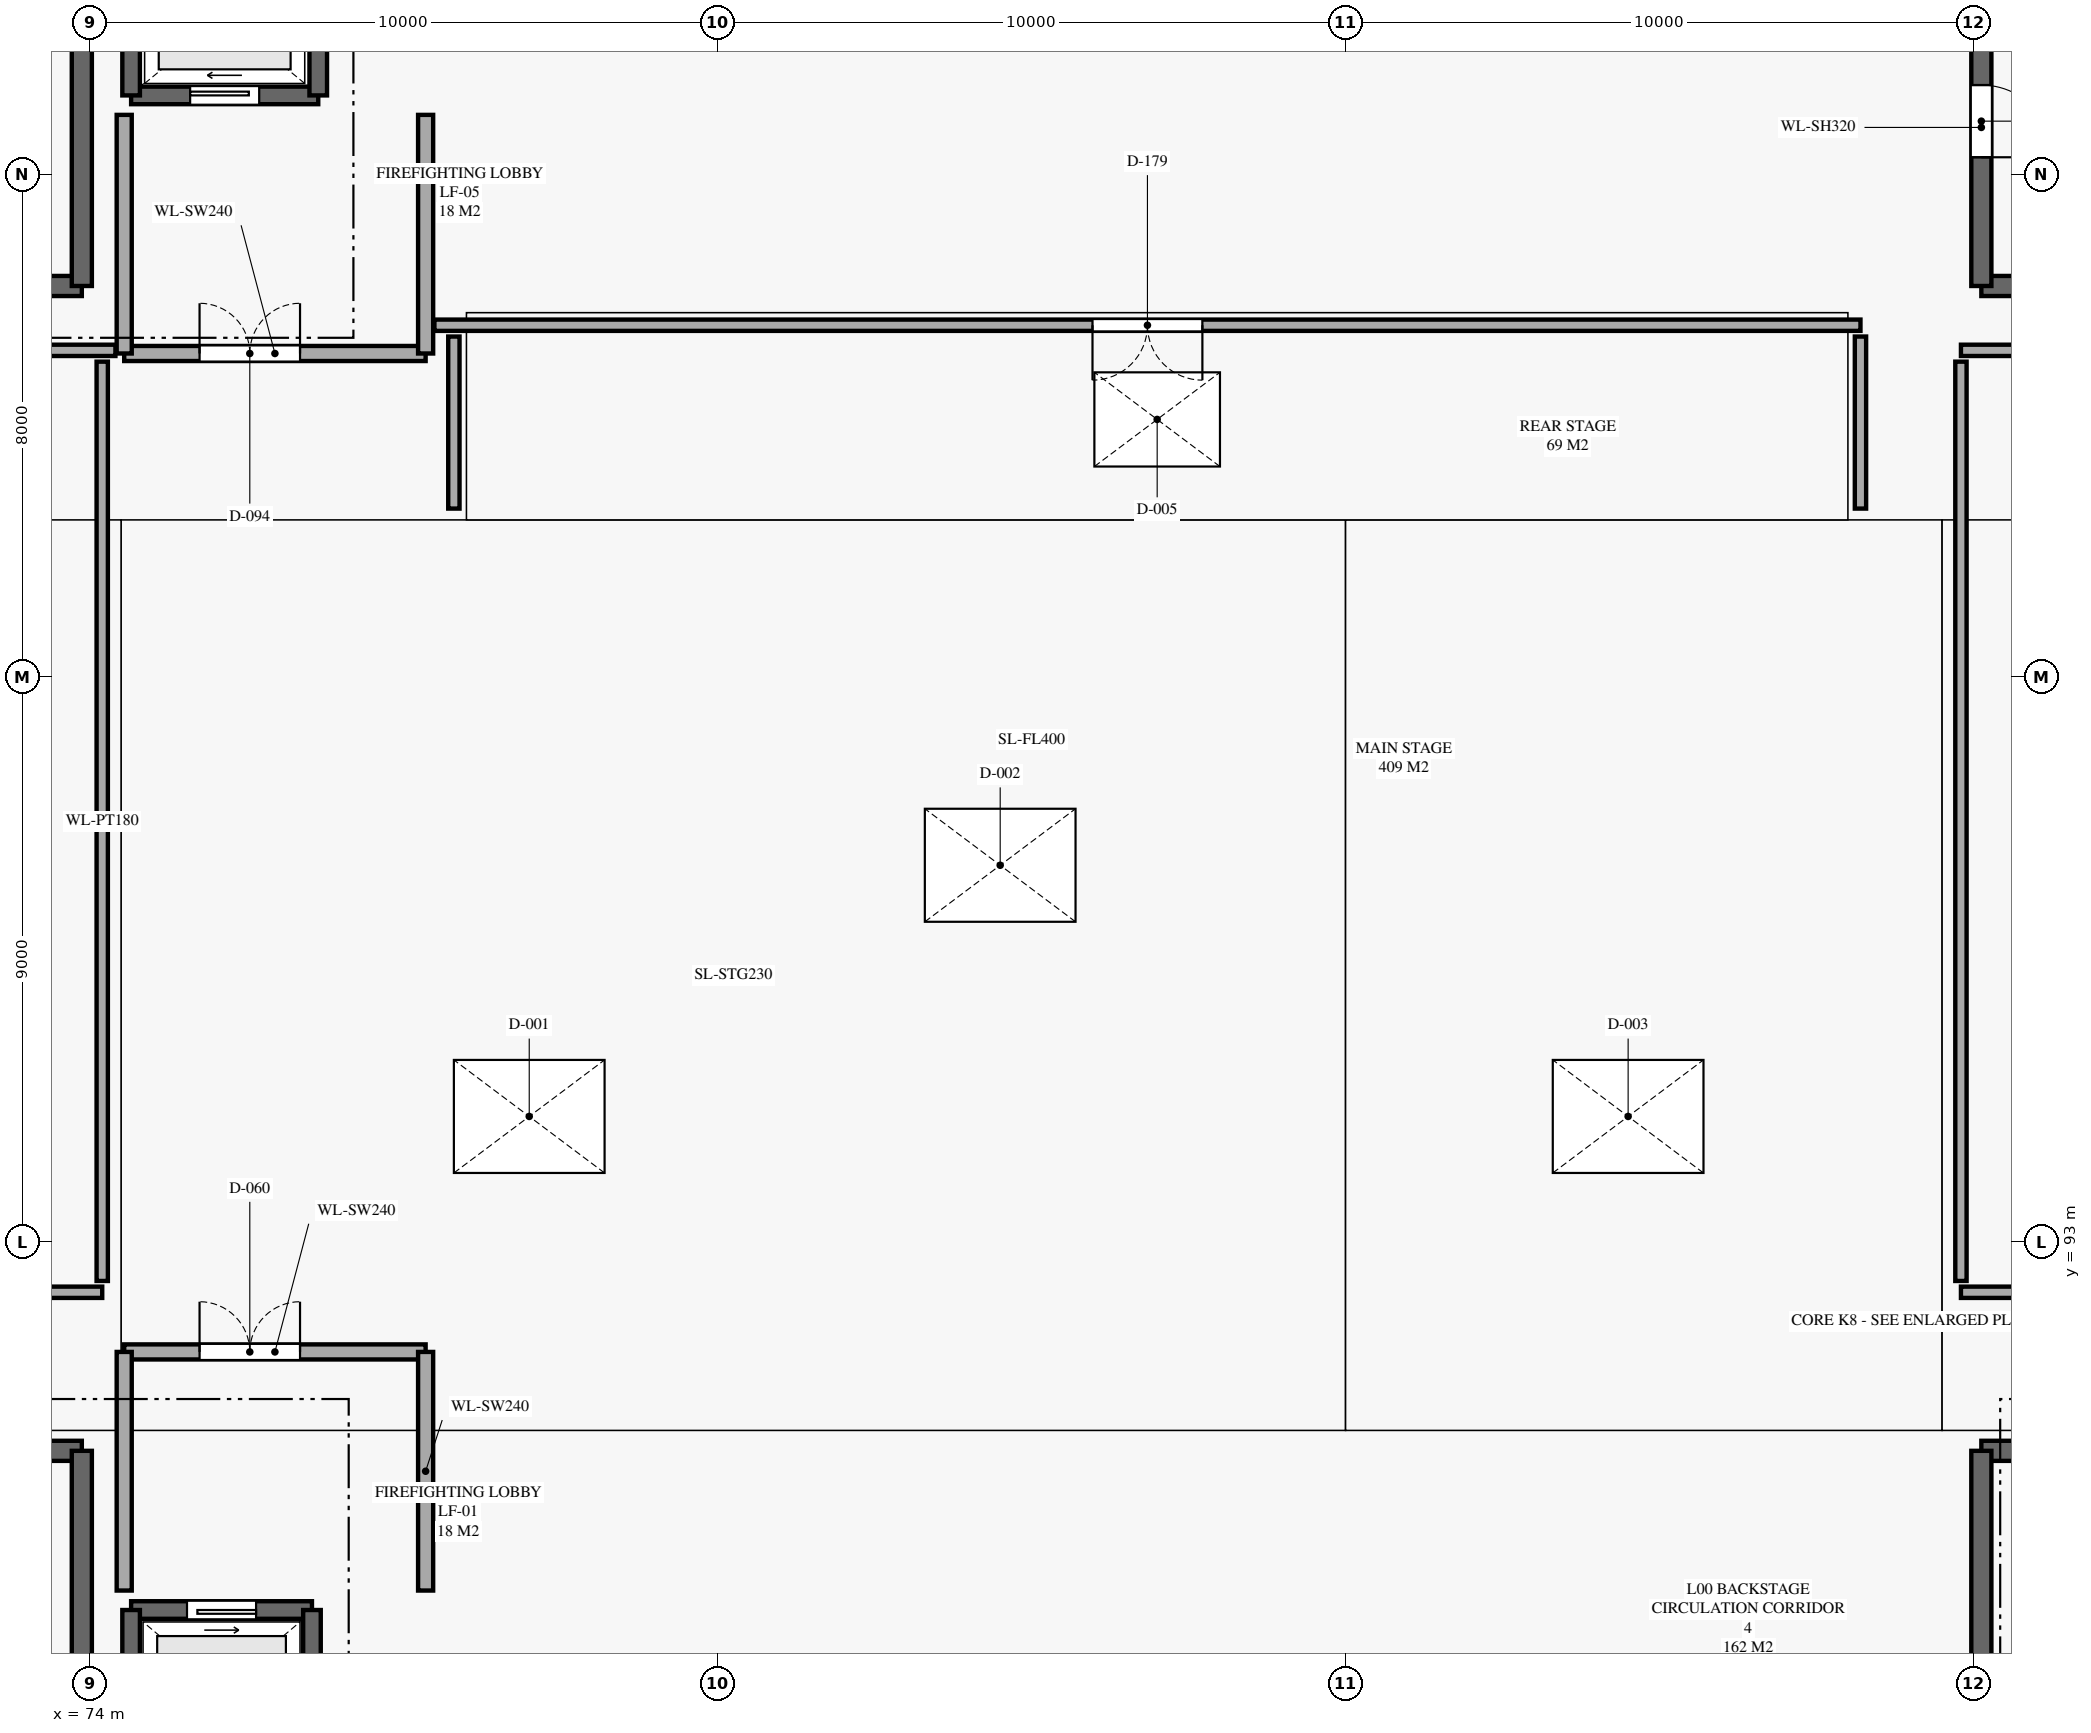
"""IFC4 building model, lengths in metres.
Left out: names, types, materials, properties, quantities, classifications, styles, units other than length and angle.
Written with IfcOpenShell. Run it as: python <this file> out.ifc"""

import sys

from ifc_helpers import new_model, si_unit, direction, frame, frame_2d, origin, origin_2d, place, context, subcontext, project, spatial, rectangle, extrude, element, fill, save


model = new_model("IFC4")
c1 = context("Model", 3, precision=1e-05, world=origin(), true_north=direction((0.0, 1.0)))
c2 = subcontext(c1, "Body", "Model", "MODEL_VIEW")
j1 = project(units=[si_unit("LENGTHUNIT", "METRE"), si_unit("PLANEANGLEUNIT", "RADIAN")], contexts=[c1])
p1 = place(None, origin())
s1 = spatial("IfcSite", under=j1, at=p1, CompositionType="ELEMENT")
p2 = place(p1, origin())
s2 = spatial("IfcBuilding", under=s1, at=p2, CompositionType="ELEMENT")
p3 = place(p2, origin())
s3 = spatial("IfcBuildingStorey", under=s2, at=p3, CompositionType="ELEMENT", Elevation=0.0)
p4 = place(p3, frame((64.625, 108.225, 0.0), z_axis=(0.0, 0.0, 1.0), x_axis=(1.0, 0.0, 0.0)))
e1 = element("IfcWall", 1, at=p4, inside=s3, PredefinedType="SHEAR", context=c2, shape_type="SweptSolid", body=[
    extrude(rectangle(XDim=9.25, YDim=0.32, at=frame_2d((4.625, 0.0))), origin(), (0.0, 0.0, 1.0), 4.675),
])
p5 = place(p3, frame((73.875, 108.225, 0.0), z_axis=(0.0, 0.0, 1.0), x_axis=(0.0, 1.0, 0.0)))
e2 = element("IfcWall", 2, at=p5, inside=s3, PredefinedType="SHEAR", context=c2, shape_type="SweptSolid", body=[
    extrude(rectangle(XDim=5.05, YDim=0.32, at=frame_2d((2.525, 0.0))), origin(), (0.0, 0.0, 1.0), 4.675),
])
p6 = place(p3, frame((104.125, 108.225, 0.0), z_axis=(0.0, 0.0, 1.0), x_axis=(1.0, 0.0, 0.0)))
e3 = element("IfcWall", 3, at=p6, inside=s3, PredefinedType="SHEAR", context=c2, shape_type="SweptSolid", body=[
    extrude(rectangle(XDim=9.25, YDim=0.32, at=frame_2d((4.625, 0.0))), origin(), (0.0, 0.0, 1.0), 4.675),
])
p7 = place(p3, frame((104.125, 113.275, 0.0), z_axis=(0.0, 0.0, 1.0), x_axis=(0.0, -1.0, 0.0)))
e4 = element("IfcWall", 4, at=p7, inside=s3, PredefinedType="SHEAR", context=c2, shape_type="SweptSolid", body=[
    extrude(rectangle(XDim=5.05, YDim=0.32, at=frame_2d((2.525, 0.0))), origin(), (0.0, 0.0, 1.0), 4.675),
])
p8 = place(p7, frame((1.85, 0.0, 0.0)))
e5 = element("IfcOpeningElement", 5, at=p8, cuts=e4, PredefinedType="OPENING", context=c2, shape_type="SweptSolid", body=[
    extrude(rectangle(XDim=1.15, YDim=2.2, at=frame_2d((0.575, 1.1))), frame((0.0, 0.17, 0.0), z_axis=(0.0, -1.0, 0.0), x_axis=(1.0, 0.0, 0.0)), (0.0, 0.0, 1.0), 0.34),
])
p9 = place(p3, frame((73.875, 89.675, 0.0), z_axis=(0.0, 0.0, 1.0), x_axis=(-1.0, 0.0, 0.0)))
e6 = element("IfcWall", 6, at=p9, inside=s3, PredefinedType="SHEAR", context=c2, shape_type="SweptSolid", body=[
    extrude(rectangle(XDim=9.25, YDim=0.32, at=frame_2d((4.625, 0.0))), origin(), (0.0, 0.0, 1.0), 4.675),
])
p10 = place(p9, frame((7.2, 0.0, 0.0)))
e7 = element("IfcOpeningElement", 7, at=p10, cuts=e6, PredefinedType="OPENING", context=c2, shape_type="SweptSolid", body=[
    extrude(rectangle(XDim=1.15, YDim=2.2, at=frame_2d((0.575, 1.1))), frame((0.0, 0.17, 0.0), z_axis=(0.0, -1.0, 0.0), x_axis=(1.0, 0.0, 0.0)), (0.0, 0.0, 1.0), 0.34),
])
p11 = place(p3, frame((73.875, 84.625, 0.0), z_axis=(0.0, 0.0, 1.0), x_axis=(0.0, 1.0, 0.0)))
e8 = element("IfcWall", 8, at=p11, inside=s3, PredefinedType="SHEAR", context=c2, shape_type="SweptSolid", body=[
    extrude(rectangle(XDim=5.05, YDim=0.32, at=frame_2d((2.525, 0.0))), origin(), (0.0, 0.0, 1.0), 4.675),
])
p12 = place(p3, frame((113.375, 89.675, 0.0), z_axis=(0.0, 0.0, 1.0), x_axis=(-1.0, 0.0, 0.0)))
e9 = element("IfcWall", 9, at=p12, inside=s3, PredefinedType="SHEAR", context=c2, shape_type="SweptSolid", body=[
    extrude(rectangle(XDim=9.25, YDim=0.32, at=frame_2d((4.625, 0.0))), origin(), (0.0, 0.0, 1.0), 4.675),
])
p13 = place(p12, frame((7.2, 0.0, 0.0)))
e10 = element("IfcOpeningElement", 10, at=p13, cuts=e9, PredefinedType="OPENING", context=c2, shape_type="SweptSolid", body=[
    extrude(rectangle(XDim=1.15, YDim=2.2, at=frame_2d((0.575, 1.1))), frame((0.0, 0.17, 0.0), z_axis=(0.0, -1.0, 0.0), x_axis=(1.0, 0.0, 0.0)), (0.0, 0.0, 1.0), 0.34),
])
p14 = place(p3, frame((104.125, 89.675, 0.0), z_axis=(0.0, 0.0, 1.0), x_axis=(0.0, -1.0, 0.0)))
e11 = element("IfcWall", 11, at=p14, inside=s3, PredefinedType="SHEAR", context=c2, shape_type="SweptSolid", body=[
    extrude(rectangle(XDim=5.05, YDim=0.32, at=frame_2d((2.525, 0.0))), origin(), (0.0, 0.0, 1.0), 4.675),
])
p15 = place(p3, frame((77.54, 87.14, 0.0), z_axis=(0.0, 0.0, 1.0), x_axis=(-1.0, 0.0, 0.0)))
e12 = element("IfcWall", 12, at=p15, inside=s3, PredefinedType="SHEAR", context=c2, shape_type="SweptSolid", body=[
    extrude(rectangle(XDim=2.88, YDim=0.28, at=frame_2d((1.44, 0.0))), origin(), (0.0, 0.0, 1.0), 4.675),
])
p16 = place(p15, frame((0.89, 0.0, 0.0)))
e13 = element("IfcOpeningElement", 13, at=p16, cuts=e12, PredefinedType="OPENING", context=c2, shape_type="SweptSolid", body=[
    extrude(rectangle(XDim=1.1, YDim=2.2, at=frame_2d((0.55, 1.1))), frame((0.0, 0.15, 0.0), z_axis=(0.0, -1.0, 0.0), x_axis=(1.0, 0.0, 0.0)), (0.0, 0.0, 1.0), 0.3),
])
for number, where, z_axis, x_axis in (
    (14, (74.66, 87.14, 0.0), (0.0, 0.0, 1.0), (0.0, -1.0, 0.0)),
    (15, (77.54, 84.66, 0.0), (0.0, 0.0, 1.0), (0.0, 1.0, 0.0)),
):
    element("IfcWall", number, at=place(p3, frame(where, z_axis=z_axis, x_axis=x_axis)), inside=s3, PredefinedType="SHEAR", context=c2, shape_type="SweptSolid", body=[
        extrude(rectangle(XDim=2.48, YDim=0.28, at=frame_2d((1.24, 0.0))), origin(), (0.0, 0.0, 1.0), 4.675),
    ])
p17 = place(p3, frame((74.55, 91.25, 0.0), z_axis=(0.0, 0.0, 1.0), x_axis=(1.0, 0.0, 0.0)))
e16 = element("IfcWall", 16, at=p17, inside=s3, PredefinedType="SOLIDWALL", context=c2, shape_type="SweptSolid", body=[
    extrude(rectangle(XDim=4.8, YDim=0.24, at=frame_2d((2.4, 0.0))), origin(), (0.0, 0.0, 1.0), 4.675),
])
p18 = place(p17, frame((1.2, 0.0, 0.0)))
e17 = element("IfcOpeningElement", 17, at=p18, cuts=e16, PredefinedType="OPENING", context=c2, shape_type="SweptSolid", body=[
    extrude(rectangle(XDim=1.6, YDim=2.2, at=frame_2d((0.8, 1.1))), frame((0.0, 0.13, 0.0), z_axis=(0.0, -1.0, 0.0), x_axis=(1.0, 0.0, 0.0)), (0.0, 0.0, 1.0), 0.26),
])
for number, where, z_axis, x_axis in (
    (18, (74.55, 91.25, 0.0), (0.0, 0.0, 1.0), (0.0, -1.0, 0.0)),
    (19, (79.35, 87.45, 0.0), (0.0, 0.0, 1.0), (0.0, 1.0, 0.0)),
):
    element("IfcWall", number, at=place(p3, frame(where, z_axis=z_axis, x_axis=x_axis)), inside=s3, PredefinedType="SOLIDWALL", context=c2, shape_type="SweptSolid", body=[
        extrude(rectangle(XDim=3.8, YDim=0.24, at=frame_2d((1.9, 0.0))), origin(), (0.0, 0.0, 1.0), 4.675),
    ])
p19 = place(p3, frame((74.66, 111.26, 0.0), z_axis=(0.0, 0.0, 1.0), x_axis=(1.0, 0.0, 0.0)))
e20 = element("IfcWall", 20, at=p19, inside=s3, PredefinedType="SHEAR", context=c2, shape_type="SweptSolid", body=[
    extrude(rectangle(XDim=2.98, YDim=0.28, at=frame_2d((1.49, 0.0))), origin(), (0.0, 0.0, 1.0), 4.675),
])
p20 = place(p19, frame((0.94, 0.0, 0.0)))
e21 = element("IfcOpeningElement", 21, at=p20, cuts=e20, PredefinedType="OPENING", context=c2, shape_type="SweptSolid", body=[
    extrude(rectangle(XDim=1.1, YDim=2.2, at=frame_2d((0.55, 1.1))), frame((0.0, 0.15, 0.0), z_axis=(0.0, -1.0, 0.0), x_axis=(1.0, 0.0, 0.0)), (0.0, 0.0, 1.0), 0.3),
])
for number, where, z_axis, x_axis in (
    (22, (74.66, 113.74, 0.0), (0.0, 0.0, 1.0), (0.0, -1.0, 0.0)),
    (23, (77.64, 111.26, 0.0), (0.0, 0.0, 1.0), (0.0, 1.0, 0.0)),
):
    element("IfcWall", number, at=place(p3, frame(where, z_axis=z_axis, x_axis=x_axis)), inside=s3, PredefinedType="SHEAR", context=c2, shape_type="SweptSolid", body=[
        extrude(rectangle(XDim=2.48, YDim=0.28, at=frame_2d((1.24, 0.0))), origin(), (0.0, 0.0, 1.0), 4.675),
    ])
p21 = place(p3, frame((74.55, 107.15, 0.0), z_axis=(0.0, 0.0, 1.0), x_axis=(1.0, 0.0, 0.0)))
e24 = element("IfcWall", 24, at=p21, inside=s3, PredefinedType="SOLIDWALL", context=c2, shape_type="SweptSolid", body=[
    extrude(rectangle(XDim=4.8, YDim=0.24, at=frame_2d((2.4, 0.0))), origin(), (0.0, 0.0, 1.0), 4.675),
])
p22 = place(p21, frame((1.2, 0.0, 0.0)))
e25 = element("IfcOpeningElement", 25, at=p22, cuts=e24, PredefinedType="OPENING", context=c2, shape_type="SweptSolid", body=[
    extrude(rectangle(XDim=1.6, YDim=2.2, at=frame_2d((0.8, 1.1))), frame((0.0, 0.13, 0.0), z_axis=(0.0, -1.0, 0.0), x_axis=(1.0, 0.0, 0.0)), (0.0, 0.0, 1.0), 0.26),
])
for number, where, z_axis, x_axis in (
    (26, (74.55, 110.95, 0.0), (0.0, 0.0, 1.0), (0.0, -1.0, 0.0)),
    (27, (79.35, 107.15, 0.0), (0.0, 0.0, 1.0), (0.0, 1.0, 0.0)),
):
    element("IfcWall", number, at=place(p3, frame(where, z_axis=z_axis, x_axis=x_axis)), inside=s3, PredefinedType="SOLIDWALL", context=c2, shape_type="SweptSolid", body=[
        extrude(rectangle(XDim=3.8, YDim=0.24, at=frame_2d((1.9, 0.0))), origin(), (0.0, 0.0, 1.0), 4.675),
    ])
p23 = place(p3, frame((64.14, 92.2, 0.0), z_axis=(0.0, 0.0, 1.0), x_axis=(1.0, 0.0, 0.0)))
e28 = element("IfcWall", 28, at=p23, inside=s3, PredefinedType="PARTITIONING", context=c2, shape_type="SweptSolid", body=[
    extrude(rectangle(XDim=10.06, YDim=0.18, at=frame_2d((5.03, 0.0))), origin(), (0.0, 0.0, 1.0), 4.675),
])
p24 = place(p23, frame((4.155, 0.0, 0.0)))
e29 = element("IfcOpeningElement", 29, at=p24, cuts=e28, PredefinedType="OPENING", context=c2, shape_type="SweptSolid", body=[
    extrude(rectangle(XDim=1.75, YDim=2.2, at=frame_2d((0.875, 1.1))), frame((0.0, 0.1, 0.0), z_axis=(0.0, -1.0, 0.0), x_axis=(1.0, 0.0, 0.0)), (0.0, 0.0, 1.0), 0.2),
])
p25 = place(p3, frame((74.41, 107.2, 0.0), z_axis=(0.0, 0.0, 1.0), x_axis=(-1.0, 0.0, 0.0)))
e30 = element("IfcWall", 30, at=p25, inside=s3, PredefinedType="PARTITIONING", context=c2, shape_type="SweptSolid", body=[
    extrude(rectangle(XDim=10.27, YDim=0.18, at=frame_2d((5.135, 0.0))), origin(), (0.0, 0.0, 1.0), 4.675),
])
p26 = place(p3, frame((74.2, 92.38, 0.0), z_axis=(0.0, 0.0, 1.0), x_axis=(0.0, 1.0, 0.0)))
e31 = element("IfcWall", 31, at=p26, inside=s3, PredefinedType="PARTITIONING", context=c2, shape_type="SweptSolid", body=[
    extrude(rectangle(XDim=14.64, YDim=0.18, at=frame_2d((7.32, 0.0))), origin(), (0.0, 0.0, 1.0), 3.573),
])
p27 = place(p3, frame((103.8, 92.2, 0.0), z_axis=(0.0, 0.0, 1.0), x_axis=(1.0, 0.0, 0.0)))
e32 = element("IfcWall", 32, at=p27, inside=s3, PredefinedType="PARTITIONING", context=c2, shape_type="SweptSolid", body=[
    extrude(rectangle(XDim=10.06, YDim=0.18, at=frame_2d((5.03, 0.0))), origin(), (0.0, 0.0, 1.0), 4.675),
])
p28 = place(p27, frame((4.155, 0.0, 0.0)))
e33 = element("IfcOpeningElement", 33, at=p28, cuts=e32, PredefinedType="OPENING", context=c2, shape_type="SweptSolid", body=[
    extrude(rectangle(XDim=1.75, YDim=2.2, at=frame_2d((0.875, 1.1))), frame((0.0, 0.1, 0.0), z_axis=(0.0, -1.0, 0.0), x_axis=(1.0, 0.0, 0.0)), (0.0, 0.0, 1.0), 0.2),
])
p29 = place(p3, frame((113.86, 107.2, 0.0), z_axis=(0.0, 0.0, 1.0), x_axis=(-1.0, 0.0, 0.0)))
e34 = element("IfcWall", 34, at=p29, inside=s3, PredefinedType="PARTITIONING", context=c2, shape_type="SweptSolid", body=[
    extrude(rectangle(XDim=10.06, YDim=0.18, at=frame_2d((5.03, 0.0))), origin(), (0.0, 0.0, 1.0), 4.675),
])
p30 = place(p3, frame((103.8, 107.02, 0.0), z_axis=(0.0, 0.0, 1.0), x_axis=(0.0, -1.0, 0.0)))
e35 = element("IfcWall", 35, at=p30, inside=s3, PredefinedType="PARTITIONING", context=c2, shape_type="SweptSolid", body=[
    extrude(rectangle(XDim=14.64, YDim=0.18, at=frame_2d((7.32, 0.0))), origin(), (0.0, 0.0, 1.0), 3.573),
])
p31 = place(p3, frame((102.2, 107.6, 0.0), z_axis=(0.0, 0.0, 1.0), x_axis=(-1.0, 0.0, 0.0)))
e36 = element("IfcWall", 36, at=p31, inside=s3, PredefinedType="PARTITIONING", context=c2, shape_type="SweptSolid", body=[
    extrude(rectangle(XDim=22.71, YDim=0.18, at=frame_2d((11.355, 0.0))), origin(), (0.0, 0.0, 1.0), 4.675),
])
p32 = place(p31, frame((10.48, 0.0, 0.0)))
e37 = element("IfcOpeningElement", 37, at=p32, cuts=e36, PredefinedType="OPENING", context=c2, shape_type="SweptSolid", body=[
    extrude(rectangle(XDim=1.75, YDim=2.2, at=frame_2d((0.875, 1.1))), frame((0.0, 0.1, 0.0), z_axis=(0.0, -1.0, 0.0), x_axis=(1.0, 0.0, 0.0)), (0.0, 0.0, 1.0), 0.2),
])
for number, where, z_axis, x_axis in (
    (38, (79.8, 107.42, 0.0), (0.0, 0.0, 1.0), (0.0, -1.0, 0.0)),
    (39, (102.2, 104.68, 0.0), (0.0, 0.0, 1.0), (0.0, 1.0, 0.0)),
):
    element("IfcWall", number, at=place(p3, frame(where, z_axis=z_axis, x_axis=x_axis)), inside=s3, PredefinedType="PARTITIONING", context=c2, shape_type="SweptSolid", body=[
        extrude(rectangle(XDim=2.74, YDim=0.18, at=frame_2d((1.37, 0.0))), origin(), (0.0, 0.0, 1.0), 4.675),
    ])
p33 = place(p3, origin())
p34 = place(p33, frame((81.0, 95.0, 0.0)))
p35 = place(p34, frame((0.0, 0.0, 0.18)))
e40 = element("IfcDoor", 40, at=p35, inside=s3, OperationType="SINGLE_SWING_LEFT", PredefinedType="TRAPDOOR", context=c2, shape_type="SweptSolid", body=[
    extrude(rectangle(XDim=2.4, YDim=1.8, at=origin_2d()), origin(), (0.0, 0.0, 1.0), 0.05),
])
p36 = place(p33, frame((88.5, 99.0, 0.0)))
p37 = place(p36, frame((0.0, 0.0, 0.18)))
e41 = element("IfcDoor", 41, at=p37, inside=s3, OperationType="SINGLE_SWING_LEFT", PredefinedType="TRAPDOOR", context=c2, shape_type="SweptSolid", body=[
    extrude(rectangle(XDim=2.4, YDim=1.8, at=origin_2d()), origin(), (0.0, 0.0, 1.0), 0.05),
])
p38 = place(p3, origin())
p39 = place(p38, frame((98.5, 95.0, 0.0)))
p40 = place(p39, frame((0.0, 0.0, 0.18)))
e42 = element("IfcDoor", 42, at=p40, inside=s3, OperationType="SINGLE_SWING_LEFT", PredefinedType="TRAPDOOR", context=c2, shape_type="SweptSolid", body=[
    extrude(rectangle(XDim=2.4, YDim=1.8, at=origin_2d()), origin(), (0.0, 0.0, 1.0), 0.05),
])
p41 = place(p3, origin())
p42 = place(p41, frame((91.0, 106.1, 0.0)))
p43 = place(p42, frame((0.0, 0.0, 0.18)))
e43 = element("IfcDoor", 43, at=p43, inside=s3, OperationType="SINGLE_SWING_RIGHT", PredefinedType="TRAPDOOR", context=c2, shape_type="SweptSolid", body=[
    extrude(rectangle(XDim=2.0, YDim=1.5, at=origin_2d()), origin(), (0.0, 0.0, 1.0), 0.05),
])
p44 = place(p8, origin())
e44 = element("IfcDoor", 44, at=p44, inside=s3, OperationType="SINGLE_SWING_RIGHT", PredefinedType="DOOR", context=c2, shape_type="SweptSolid", body=[
    extrude(rectangle(XDim=1.15, YDim=2.2, at=frame_2d((0.575, 1.1))), frame((0.0, 0.025, 0.0), z_axis=(0.0, -1.0, 0.0), x_axis=(1.0, 0.0, 0.0)), (0.0, 0.0, 1.0), 0.05),
])
fill(e5, e44)
p45 = place(p16, origin())
e45 = element("IfcDoor", 45, at=p45, inside=s3, OperationType="SLIDING_TO_LEFT", PredefinedType="DOOR", context=c2, shape_type="SweptSolid", body=[
    extrude(rectangle(XDim=1.1, YDim=2.2, at=frame_2d((0.55, 1.1))), frame((0.0, 0.025, 0.0), z_axis=(0.0, -1.0, 0.0), x_axis=(1.0, 0.0, 0.0)), (0.0, 0.0, 1.0), 0.05),
])
fill(e13, e45)
p46 = place(p18, origin())
e46 = element("IfcDoor", 46, at=p46, inside=s3, OperationType="DOUBLE_DOOR_SINGLE_SWING", PredefinedType="DOOR", context=c2, shape_type="SweptSolid", body=[
    extrude(rectangle(XDim=1.6, YDim=2.2, at=frame_2d((0.8, 1.1))), frame((0.0, 0.025, 0.0), z_axis=(0.0, -1.0, 0.0), x_axis=(1.0, 0.0, 0.0)), (0.0, 0.0, 1.0), 0.05),
])
fill(e17, e46)
p47 = place(p20, origin())
e47 = element("IfcDoor", 47, at=p47, inside=s3, OperationType="SLIDING_TO_LEFT", PredefinedType="DOOR", context=c2, shape_type="SweptSolid", body=[
    extrude(rectangle(XDim=1.1, YDim=2.2, at=frame_2d((0.55, 1.1))), frame((0.0, 0.025, 0.0), z_axis=(0.0, -1.0, 0.0), x_axis=(1.0, 0.0, 0.0)), (0.0, 0.0, 1.0), 0.05),
])
fill(e21, e47)
p48 = place(p22, origin())
e48 = element("IfcDoor", 48, at=p48, inside=s3, OperationType="DOUBLE_DOOR_SINGLE_SWING", PredefinedType="DOOR", context=c2, shape_type="SweptSolid", body=[
    extrude(rectangle(XDim=1.6, YDim=2.2, at=frame_2d((0.8, 1.1))), frame((0.0, 0.025, 0.0), z_axis=(0.0, -1.0, 0.0), x_axis=(1.0, 0.0, 0.0)), (0.0, 0.0, 1.0), 0.05),
])
fill(e25, e48)
p49 = place(p32, origin())
e49 = element("IfcDoor", 49, at=p49, inside=s3, OperationType="DOUBLE_DOOR_SINGLE_SWING", PredefinedType="DOOR", context=c2, shape_type="SweptSolid", body=[
    extrude(rectangle(XDim=1.75, YDim=2.2, at=frame_2d((0.875, 1.1))), frame((0.0, 0.025, 0.0), z_axis=(0.0, -1.0, 0.0), x_axis=(1.0, 0.0, 0.0)), (0.0, 0.0, 1.0), 0.05),
])
fill(e37, e49)
save(model, sys.argv[1])
